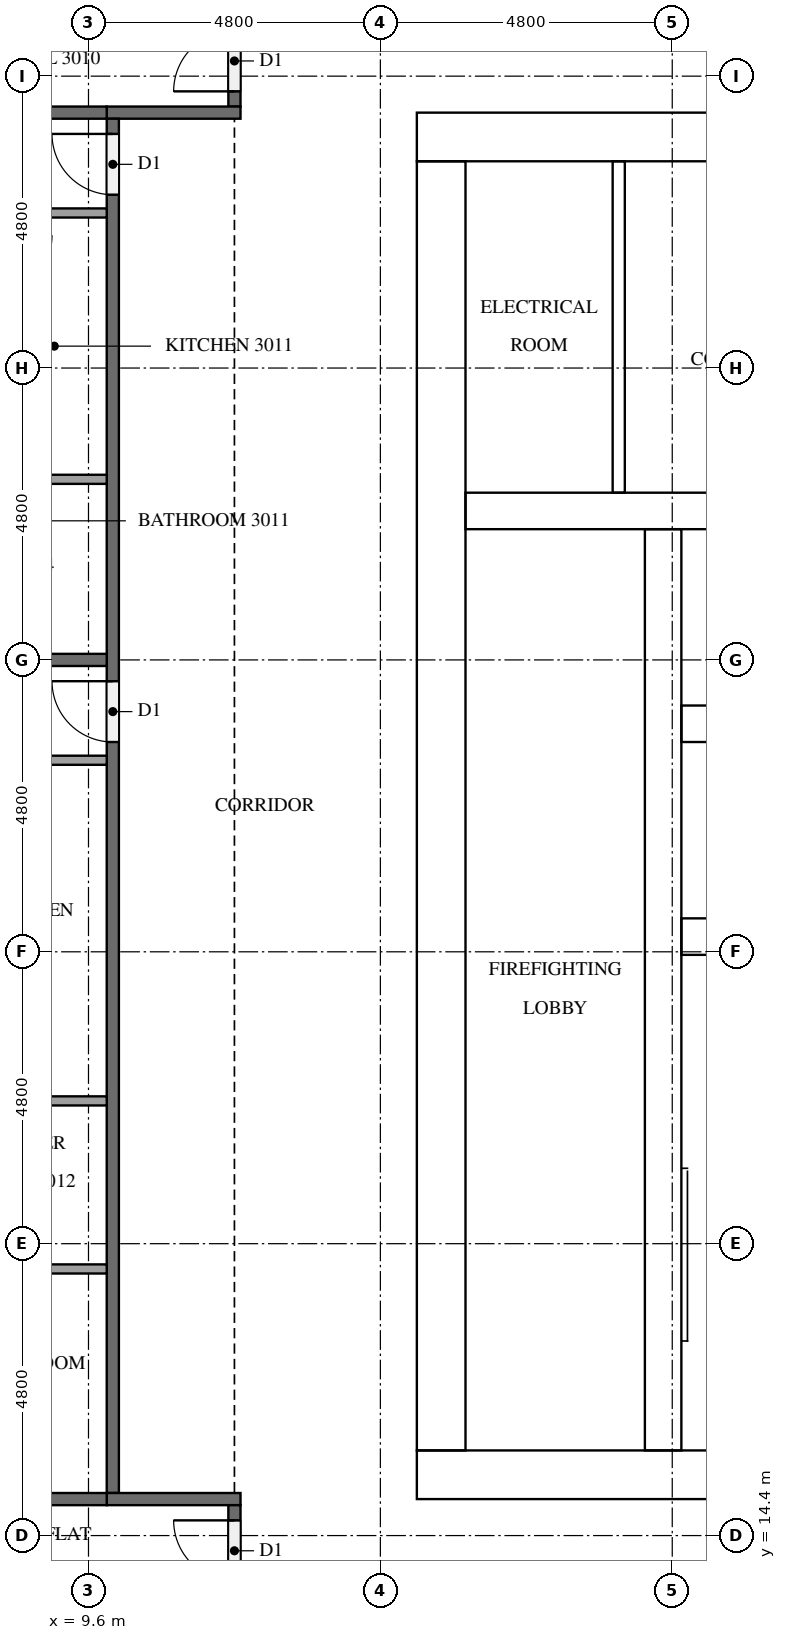
"""IFC4 building model, lengths in metres.
Left out: names, types, materials, properties, quantities, classifications, styles, units other than length and angle.
Written with IfcOpenShell. Run it as: python <this file> out.ifc"""

import sys

from ifc_helpers import new_model, si_unit, direction, frame, frame_2d, origin, place, context, subcontext, project, spatial, rectangle, extrude, element, fill, save


model = new_model("IFC4")
c1 = context("Model", 3, precision=1e-05, world=origin(), true_north=direction((0.0, 1.0)))
c2 = subcontext(c1, "Body", "Model", "MODEL_VIEW")
j1 = project(units=[si_unit("LENGTHUNIT", "METRE"), si_unit("PLANEANGLEUNIT", "RADIAN")], contexts=[c1])
p1 = place(None, origin())
s1 = spatial("IfcSite", under=j1, at=p1, CompositionType="ELEMENT")
p2 = place(p1, origin())
s2 = spatial("IfcBuilding", under=s1, at=p2, CompositionType="ELEMENT")
p3 = place(p2, frame((0.0, 0.0, 119.1)))
s3 = spatial("IfcBuildingStorey", under=s2, at=p3, CompositionType="ELEMENT", Elevation=119.1)
p4 = place(p3, frame((15.0, 15.4, 0.0), z_axis=(0.0, 0.0, 1.0), x_axis=(1.0, 0.0, 0.0)))
e1 = element("IfcWall", 1, at=p4, inside=s3, PredefinedType="SHEAR", context=c2, shape_type="SweptSolid", body=[
    extrude(rectangle(XDim=32.4, YDim=0.8, at=frame_2d((16.2, 0.0))), origin(), (0.0, 0.0, 1.0), 3.2),
])
p5 = place(p4, frame((15.3, 0.0, 0.0)))
e2 = element("IfcOpeningElement", 2, at=p5, cuts=e1, PredefinedType="OPENING", context=c2, shape_type="SweptSolid", body=[
    extrude(rectangle(XDim=1.8, YDim=2.1, at=frame_2d((0.9, 1.05))), frame((0.0, 0.41, 0.0), z_axis=(0.0, -1.0, 0.0), x_axis=(1.0, 0.0, 0.0)), (0.0, 0.0, 1.0), 0.82),
])
p6 = place(p3, frame((15.0, 37.4, 0.0), z_axis=(0.0, 0.0, 1.0), x_axis=(1.0, 0.0, 0.0)))
e3 = element("IfcWall", 3, at=p6, inside=s3, PredefinedType="SHEAR", context=c2, shape_type="SweptSolid", body=[
    extrude(rectangle(XDim=32.4, YDim=0.8, at=frame_2d((16.2, 0.0))), origin(), (0.0, 0.0, 1.0), 3.2),
])
p7 = place(p6, frame((15.3, 0.0, 0.0)))
e4 = element("IfcOpeningElement", 4, at=p7, cuts=e3, PredefinedType="OPENING", context=c2, shape_type="SweptSolid", body=[
    extrude(rectangle(XDim=1.8, YDim=2.1, at=frame_2d((0.9, 1.05))), frame((0.0, 0.41, 0.0), z_axis=(0.0, -1.0, 0.0), x_axis=(1.0, 0.0, 0.0)), (0.0, 0.0, 1.0), 0.82),
])
p8 = place(p6, frame((1.51, 0.0, 0.0)))
e5 = element("IfcOpeningElement", 5, at=p8, cuts=e3, PredefinedType="OPENING", context=c2, shape_type="SweptSolid", body=[
    extrude(rectangle(XDim=1.0, YDim=2.1, at=frame_2d((0.5, 1.05))), frame((0.0, 0.41, 0.0), z_axis=(0.0, -1.0, 0.0), x_axis=(1.0, 0.0, 0.0)), (0.0, 0.0, 1.0), 0.82),
])
p9 = place(p6, frame((5.11, 0.0, 0.0)))
e6 = element("IfcOpeningElement", 6, at=p9, cuts=e3, PredefinedType="OPENING", context=c2, shape_type="SweptSolid", body=[
    extrude(rectangle(XDim=1.0, YDim=2.1, at=frame_2d((0.5, 1.05))), frame((0.0, 0.41, 0.0), z_axis=(0.0, -1.0, 0.0), x_axis=(1.0, 0.0, 0.0)), (0.0, 0.0, 1.0), 0.82),
])
p10 = place(p3, frame((15.4, 15.8, 0.0), z_axis=(0.0, 0.0, 1.0), x_axis=(0.0, 1.0, 0.0)))
e7 = element("IfcWall", 7, at=p10, inside=s3, PredefinedType="SHEAR", context=c2, shape_type="SweptSolid", body=[
    extrude(rectangle(XDim=21.2, YDim=0.8, at=frame_2d((10.6, 0.0))), origin(), (0.0, 0.0, 1.0), 3.2),
])
p11 = place(p10, frame((4.96, 0.0, 0.0)))
e8 = element("IfcOpeningElement", 8, at=p11, cuts=e7, PredefinedType="OPENING", context=c2, shape_type="SweptSolid", body=[
    extrude(rectangle(XDim=1.2, YDim=2.1, at=frame_2d((0.6, 1.05))), frame((0.0, 0.41, 0.0), z_axis=(0.0, -1.0, 0.0), x_axis=(1.0, 0.0, 0.0)), (0.0, 0.0, 1.0), 0.82),
])
p12 = place(p3, frame((19.05, 15.8, 0.0), z_axis=(0.0, 0.0, 1.0), x_axis=(0.0, 1.0, 0.0)))
e9 = element("IfcWall", 9, at=p12, inside=s3, PredefinedType="SHEAR", context=c2, shape_type="SweptSolid", body=[
    extrude(rectangle(XDim=15.15, YDim=0.6, at=frame_2d((7.575, 0.0))), origin(), (0.0, 0.0, 1.0), 3.2),
])
p13 = place(p12, frame((9.65, 0.0, 0.0)))
e10 = element("IfcOpeningElement", 10, at=p13, cuts=e9, PredefinedType="OPENING", context=c2, shape_type="SweptSolid", body=[
    extrude(rectangle(XDim=1.1, YDim=2.1, at=frame_2d((0.55, 1.05))), frame((0.0, 0.31, 0.0), z_axis=(0.0, -1.0, 0.0), x_axis=(1.0, 0.0, 0.0)), (0.0, 0.0, 1.0), 0.62),
])
p14 = place(p12, frame((13.15, 0.0, 0.0)))
e11 = element("IfcOpeningElement", 11, at=p14, cuts=e9, PredefinedType="OPENING", context=c2, shape_type="SweptSolid", body=[
    extrude(rectangle(XDim=1.1, YDim=2.1, at=frame_2d((0.55, 1.05))), frame((0.0, 0.31, 0.0), z_axis=(0.0, -1.0, 0.0), x_axis=(1.0, 0.0, 0.0)), (0.0, 0.0, 1.0), 0.62),
])
p15 = place(p12, frame((0.4, 0.0, 0.0)))
e12 = element("IfcOpeningElement", 12, at=p15, cuts=e9, PredefinedType="OPENING", context=c2, shape_type="SweptSolid", body=[
    extrude(rectangle(XDim=1.2, YDim=2.1, at=frame_2d((0.6, 1.05))), frame((0.0, 0.31, 0.0), z_axis=(0.0, -1.0, 0.0), x_axis=(1.0, 0.0, 0.0)), (0.0, 0.0, 1.0), 0.62),
])
for number, where, z_axis, x_axis in (
    (13, (19.35, 24.25, 0.0), (0.0, 0.0, 1.0), (1.0, 0.0, 0.0)),
    (14, (19.35, 27.75, 0.0), (0.0, 0.0, 1.0), (1.0, 0.0, 0.0)),
):
    element("IfcWall", number, at=place(p3, frame(where, z_axis=z_axis, x_axis=x_axis)), inside=s3, PredefinedType="SHEAR", context=c2, shape_type="SweptSolid", body=[
        extrude(rectangle(XDim=3.45, YDim=0.6, at=frame_2d((1.725, 0.0))), origin(), (0.0, 0.0, 1.0), 3.2),
    ])
p16 = place(p3, frame((15.8, 31.25, 0.0), z_axis=(0.0, 0.0, 1.0), x_axis=(1.0, 0.0, 0.0)))
e15 = element("IfcWall", 15, at=p16, inside=s3, PredefinedType="SHEAR", context=c2, shape_type="SweptSolid", body=[
    extrude(rectangle(XDim=7.0, YDim=0.6, at=frame_2d((3.5, 0.0))), origin(), (0.0, 0.0, 1.0), 3.2),
])
p17 = place(p3, frame((18.32, 31.55, 0.0), z_axis=(0.0, 0.0, 1.0), x_axis=(0.0, 1.0, 0.0)))
e16 = element("IfcWall", 16, at=p17, inside=s3, PredefinedType="PARTITIONING", context=c2, shape_type="SweptSolid", body=[
    extrude(rectangle(XDim=5.45, YDim=0.2, at=frame_2d((2.725, 0.0))), origin(), (0.0, 0.0, 1.0), 3.2),
])
p18 = place(p3, frame((12.0, 37.9, 0.0), z_axis=(0.0, 0.0, 1.0), x_axis=(0.0, 1.0, 0.0)))
e17 = element("IfcWall", 17, at=p18, inside=s3, PredefinedType="PARTITIONING", context=c2, shape_type="SweptSolid", body=[
    extrude(rectangle(XDim=2.8, YDim=0.2, at=frame_2d((1.4, 0.0))), origin(), (0.0, 0.0, 1.0), 3.2),
])
p19 = place(p18, frame((0.25, 0.0, 0.0)))
e18 = element("IfcOpeningElement", 18, at=p19, cuts=e17, PredefinedType="OPENING", context=c2, shape_type="SweptSolid", body=[
    extrude(rectangle(XDim=1.0, YDim=2.1, at=frame_2d((0.5, 1.05))), frame((0.0, 0.11, 0.0), z_axis=(0.0, -1.0, 0.0), x_axis=(1.0, 0.0, 0.0)), (0.0, 0.0, 1.0), 0.22),
])
p20 = place(p3, frame((12.1, 37.8, 0.0), z_axis=(0.0, 0.0, 1.0), x_axis=(-1.0, 0.0, 0.0)))
e19 = element("IfcWall", 19, at=p20, inside=s3, PredefinedType="PARTITIONING", context=c2, shape_type="SweptSolid", body=[
    extrude(rectangle(XDim=2.2, YDim=0.2, at=frame_2d((1.1, 0.0))), origin(), (0.0, 0.0, 1.0), 3.2),
])
p21 = place(p3, frame((10.0, 15.1, 0.0), z_axis=(0.0, 0.0, 1.0), x_axis=(0.0, 1.0, 0.0)))
e20 = element("IfcWall", 20, at=p21, inside=s3, PredefinedType="PARTITIONING", context=c2, shape_type="SweptSolid", body=[
    extrude(rectangle(XDim=22.6, YDim=0.2, at=frame_2d((11.3, 0.0))), origin(), (0.0, 0.0, 1.0), 3.2),
])
p22 = place(p21, frame((21.35, 0.0, 0.0)))
e21 = element("IfcOpeningElement", 21, at=p22, cuts=e20, PredefinedType="OPENING", context=c2, shape_type="SweptSolid", body=[
    extrude(rectangle(XDim=1.0, YDim=2.1, at=frame_2d((0.5, 1.05))), frame((0.0, 0.11, 0.0), z_axis=(0.0, -1.0, 0.0), x_axis=(1.0, 0.0, 0.0)), (0.0, 0.0, 1.0), 0.22),
])
p23 = place(p21, frame((12.35, 0.0, 0.0)))
e22 = element("IfcOpeningElement", 22, at=p23, cuts=e20, PredefinedType="OPENING", context=c2, shape_type="SweptSolid", body=[
    extrude(rectangle(XDim=1.0, YDim=2.1, at=frame_2d((0.5, 1.05))), frame((0.0, 0.11, 0.0), z_axis=(0.0, -1.0, 0.0), x_axis=(1.0, 0.0, 0.0)), (0.0, 0.0, 1.0), 0.22),
])
p24 = place(p3, frame((9.9, 15.0, 0.0), z_axis=(0.0, 0.0, 1.0), x_axis=(1.0, 0.0, 0.0)))
e23 = element("IfcWall", 23, at=p24, inside=s3, PredefinedType="PARTITIONING", context=c2, shape_type="SweptSolid", body=[
    extrude(rectangle(XDim=2.2, YDim=0.2, at=frame_2d((1.1, 0.0))), origin(), (0.0, 0.0, 1.0), 3.2),
])
p25 = place(p3, frame((12.0, 12.1, 0.0), z_axis=(0.0, 0.0, 1.0), x_axis=(0.0, 1.0, 0.0)))
e24 = element("IfcWall", 24, at=p25, inside=s3, PredefinedType="PARTITIONING", context=c2, shape_type="SweptSolid", body=[
    extrude(rectangle(XDim=2.8, YDim=0.2, at=frame_2d((1.4, 0.0))), origin(), (0.0, 0.0, 1.0), 3.2),
])
p26 = place(p25, frame((1.55, 0.0, 0.0)))
e25 = element("IfcOpeningElement", 25, at=p26, cuts=e24, PredefinedType="OPENING", context=c2, shape_type="SweptSolid", body=[
    extrude(rectangle(XDim=1.0, YDim=2.1, at=frame_2d((0.5, 1.05))), frame((0.0, 0.11, 0.0), z_axis=(0.0, -1.0, 0.0), x_axis=(1.0, 0.0, 0.0)), (0.0, 0.0, 1.0), 0.22),
])
for number, where, z_axis, x_axis in (
    (26, (0.375, 37.8, 0.0), (0.0, 0.0, 1.0), (1.0, 0.0, 0.0)),
    (27, (0.375, 28.8, 0.0), (0.0, 0.0, 1.0), (1.0, 0.0, 0.0)),
):
    element("IfcWall", number, at=place(p3, frame(where, z_axis=z_axis, x_axis=x_axis)), inside=s3, PredefinedType="PARTITIONING", context=c2, shape_type="SweptSolid", body=[
        extrude(rectangle(XDim=9.525, YDim=0.2, at=frame_2d((4.762, 0.0))), origin(), (0.0, 0.0, 1.0), 3.2),
    ])
p27 = place(p3, frame((0.1, 15.0, 0.0), z_axis=(0.0, 0.0, 1.0), x_axis=(1.0, 0.0, 0.0)))
e28 = element("IfcWall", 28, at=p27, inside=s3, PredefinedType="PARTITIONING", context=c2, shape_type="SweptSolid", body=[
    extrude(rectangle(XDim=9.8, YDim=0.2, at=frame_2d((4.9, 0.0))), origin(), (0.0, 0.0, 1.0), 3.2),
])
p28 = place(p3, frame((9.9, 31.77, 0.0), z_axis=(0.0, 0.0, 1.0), x_axis=(-1.0, 0.0, 0.0)))
e29 = element("IfcWall", 29, at=p28, inside=s3, PredefinedType="PARTITIONING", context=c2, shape_type="SweptSolid", body=[
    extrude(rectangle(XDim=1.725, YDim=0.15, at=frame_2d((0.862, 0.0))), origin(), (0.0, 0.0, 1.0), 3.2),
])
p29 = place(p3, frame((9.9, 36.15, 0.0), z_axis=(0.0, 0.0, 1.0), x_axis=(-1.0, 0.0, 0.0)))
e30 = element("IfcWall", 30, at=p29, inside=s3, PredefinedType="PARTITIONING", context=c2, shape_type="SweptSolid", body=[
    extrude(rectangle(XDim=1.875, YDim=0.15, at=frame_2d((0.938, 0.0))), origin(), (0.0, 0.0, 1.0), 3.2),
])
for number, where, z_axis, x_axis in (
    (31, (9.9, 21.548, 0.0), (0.0, 0.0, 1.0), (-1.0, 0.0, 0.0)),
    (32, (9.9, 18.785, 0.0), (0.0, 0.0, 1.0), (-1.0, 0.0, 0.0)),
):
    element("IfcWall", number, at=place(p3, frame(where, z_axis=z_axis, x_axis=x_axis)), inside=s3, PredefinedType="PARTITIONING", context=c2, shape_type="SweptSolid", body=[
        extrude(rectangle(XDim=2.475, YDim=0.15, at=frame_2d((1.237, 0.0))), origin(), (0.0, 0.0, 1.0), 3.2),
    ])
p30 = place(p3, frame((9.9, 27.15, 0.0), z_axis=(0.0, 0.0, 1.0), x_axis=(-1.0, 0.0, 0.0)))
e33 = element("IfcWall", 33, at=p30, inside=s3, PredefinedType="PARTITIONING", context=c2, shape_type="SweptSolid", body=[
    extrude(rectangle(XDim=2.625, YDim=0.15, at=frame_2d((1.312, 0.0))), origin(), (0.0, 0.0, 1.0), 3.2),
])
p31 = place(p13, origin())
e34 = element("IfcDoor", 34, at=p31, inside=s3, OperationType="DOUBLE_DOOR_SLIDING", PredefinedType="DOOR", context=c2, shape_type="SweptSolid", body=[
    extrude(rectangle(XDim=1.1, YDim=2.1, at=frame_2d((0.55, 1.05))), frame((0.0, 0.025, 0.0), z_axis=(0.0, -1.0, 0.0), x_axis=(1.0, 0.0, 0.0)), (0.0, 0.0, 1.0), 0.05),
])
fill(e10, e34)
p32 = place(p14, origin())
e35 = element("IfcDoor", 35, at=p32, inside=s3, OperationType="DOUBLE_DOOR_SLIDING", PredefinedType="DOOR", context=c2, shape_type="SweptSolid", body=[
    extrude(rectangle(XDim=1.1, YDim=2.1, at=frame_2d((0.55, 1.05))), frame((0.0, 0.025, 0.0), z_axis=(0.0, -1.0, 0.0), x_axis=(1.0, 0.0, 0.0)), (0.0, 0.0, 1.0), 0.05),
])
fill(e11, e35)
p33 = place(p15, frame((1.2, 0.0, 0.0), z_axis=(0.0, 0.0, 1.0), x_axis=(-1.0, 0.0, 0.0)))
e36 = element("IfcDoor", 36, at=p33, inside=s3, OperationType="SINGLE_SWING_RIGHT", PredefinedType="DOOR", context=c2, shape_type="SweptSolid", body=[
    extrude(rectangle(XDim=1.2, YDim=2.1, at=frame_2d((0.6, 1.05))), frame((0.0, 0.025, 0.0), z_axis=(0.0, -1.0, 0.0), x_axis=(1.0, 0.0, 0.0)), (0.0, 0.0, 1.0), 0.05),
])
fill(e12, e36)
p34 = place(p11, frame((1.2, 0.0, 0.0), z_axis=(0.0, 0.0, 1.0), x_axis=(-1.0, 0.0, 0.0)))
e37 = element("IfcDoor", 37, at=p34, inside=s3, OperationType="SINGLE_SWING_LEFT", PredefinedType="DOOR", context=c2, shape_type="SweptSolid", body=[
    extrude(rectangle(XDim=1.2, YDim=2.1, at=frame_2d((0.6, 1.05))), frame((0.0, 0.025, 0.0), z_axis=(0.0, -1.0, 0.0), x_axis=(1.0, 0.0, 0.0)), (0.0, 0.0, 1.0), 0.05),
])
fill(e8, e37)
p35 = place(p8, origin())
e38 = element("IfcDoor", 38, at=p35, inside=s3, OperationType="SINGLE_SWING_LEFT", PredefinedType="DOOR", context=c2, shape_type="SweptSolid", body=[
    extrude(rectangle(XDim=1.0, YDim=2.1, at=frame_2d((0.5, 1.05))), frame((0.0, 0.025, 0.0), z_axis=(0.0, -1.0, 0.0), x_axis=(1.0, 0.0, 0.0)), (0.0, 0.0, 1.0), 0.05),
])
fill(e5, e38)
p36 = place(p19, origin())
e39 = element("IfcDoor", 39, at=p36, inside=s3, OperationType="SINGLE_SWING_LEFT", PredefinedType="DOOR", context=c2, shape_type="SweptSolid", body=[
    extrude(rectangle(XDim=1.0, YDim=2.1, at=frame_2d((0.5, 1.05))), frame((0.0, 0.025, 0.0), z_axis=(0.0, -1.0, 0.0), x_axis=(1.0, 0.0, 0.0)), (0.0, 0.0, 1.0), 0.05),
])
fill(e18, e39)
p37 = place(p22, origin())
e40 = element("IfcDoor", 40, at=p37, inside=s3, OperationType="SINGLE_SWING_RIGHT", PredefinedType="DOOR", context=c2, shape_type="SweptSolid", body=[
    extrude(rectangle(XDim=1.0, YDim=2.1, at=frame_2d((0.5, 1.05))), frame((0.0, 0.025, 0.0), z_axis=(0.0, -1.0, 0.0), x_axis=(1.0, 0.0, 0.0)), (0.0, 0.0, 1.0), 0.05),
])
fill(e21, e40)
p38 = place(p23, origin())
e41 = element("IfcDoor", 41, at=p38, inside=s3, OperationType="SINGLE_SWING_RIGHT", PredefinedType="DOOR", context=c2, shape_type="SweptSolid", body=[
    extrude(rectangle(XDim=1.0, YDim=2.1, at=frame_2d((0.5, 1.05))), frame((0.0, 0.025, 0.0), z_axis=(0.0, -1.0, 0.0), x_axis=(1.0, 0.0, 0.0)), (0.0, 0.0, 1.0), 0.05),
])
fill(e22, e41)
p39 = place(p26, origin())
e42 = element("IfcDoor", 42, at=p39, inside=s3, OperationType="SINGLE_SWING_RIGHT", PredefinedType="DOOR", context=c2, shape_type="SweptSolid", body=[
    extrude(rectangle(XDim=1.0, YDim=2.1, at=frame_2d((0.5, 1.05))), frame((0.0, 0.025, 0.0), z_axis=(0.0, -1.0, 0.0), x_axis=(1.0, 0.0, 0.0)), (0.0, 0.0, 1.0), 0.05),
])
fill(e25, e42)
save(model, sys.argv[1])
